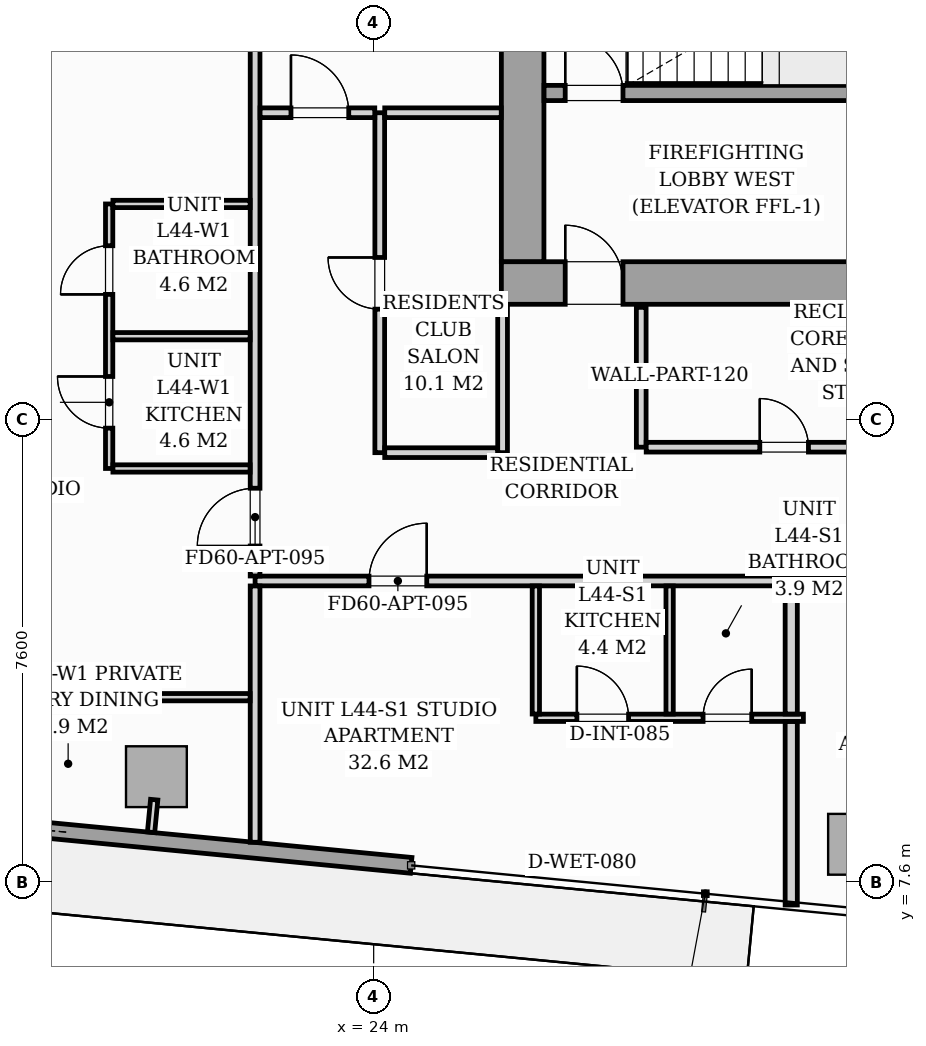
"""IFC4 building model, lengths in metres.
Left out: names, types, materials, properties, quantities, classifications, styles, units other than length and angle.
Written with IfcOpenShell. Run it as: python <this file> out.ifc"""

import sys

from ifc_helpers import new_model, si_unit, direction, frame, frame_2d, origin, origin_2d, place, context, subcontext, project, spatial, rectangle, i_section, extrude, source, transform, mapped, element, fill, save


model = new_model("IFC4")
c1 = context("Model", 3, precision=1e-05, world=origin(), true_north=direction((0.0, 1.0)))
c2 = subcontext(c1, "Body", "Model", "MODEL_VIEW")
j1 = project(units=[si_unit("LENGTHUNIT", "METRE"), si_unit("PLANEANGLEUNIT", "RADIAN")], contexts=[c1])
p1 = place(None, origin())
s1 = spatial("IfcSite", under=j1, at=p1, CompositionType="ELEMENT")
p2 = place(p1, origin())
s2 = spatial("IfcBuilding", under=s1, at=p2, CompositionType="ELEMENT")
p3 = place(p2, frame((0.0, 0.0, 153.4)))
s3 = spatial("IfcBuildingStorey", under=s2, at=p3, CompositionType="ELEMENT", Elevation=153.4)
m1 = source(origin(), c2, "Body", "SweptSolid", [
    extrude(i_section(OverallWidth=0.421, OverallDepth=0.465, WebThickness=0.045, FlangeThickness=0.073, FilletRadius=0.018, at=origin_2d()), origin(), (0.0, 0.0, 1.0), 3.196),
])
p4 = place(p3, frame((26.4, 17.4, 0.002), z_axis=(0.0, 0.0, 1.0), x_axis=(1.0, 0.0, 0.0)))
e1 = element("IfcColumn", 1, at=p4, inside=s3, PredefinedType="PILASTER", context=c2, shape_type="MappedRepresentation", body=[
    mapped(m1, transform((0.0, 0.0, 0.0), scale=1.0)),
])
m2 = source(origin(), c2, "Body", "SweptSolid", [
    extrude(rectangle(XDim=1.0, YDim=1.0, at=origin_2d()), origin(), (0.0, 0.0, 1.0), 3.196),
])
for number, where, z_axis, x_axis in (
    (2, (20.427, 9.332, 0.002), (0.0, 0.0, 1.0), (0.995, -0.096, 0.0)),
    (3, (31.974, 8.22, 0.002), (0.0, 0.0, 1.0), (0.995, -0.096, 0.0)),
):
    element("IfcColumn", number, at=place(p3, frame(where, z_axis=z_axis, x_axis=x_axis)), inside=s3, PredefinedType="COLUMN", context=c2, shape_type="MappedRepresentation", body=[
        mapped(m2, transform((0.0, 0.0, 0.0), scale=1.0)),
    ])
p5 = place(p3, frame((24.617, 7.873, 0.0), z_axis=(0.0, 0.0, 1.0), x_axis=(-0.995395976631, 0.095848055311, 0.0)))
e4 = element("IfcWall", 4, at=p5, inside=s3, PredefinedType="STANDARD", context=c2, shape_type="SweptSolid", body=[
    extrude(rectangle(XDim=17.01, YDim=0.26, at=frame_2d((8.505, 0.0))), origin(), (0.0, 0.0, 1.0), 2.94),
])
p6 = place(p5, frame((6.51, 0.0, 0.0)))
e5 = element("IfcOpeningElement", 5, at=p6, cuts=e4, PredefinedType="OPENING", context=c2, shape_type="SweptSolid", body=[
    extrude(rectangle(XDim=1.8, YDim=2.06, at=frame_2d((0.9, 1.03))), frame((0.0, 0.14, 0.0), z_axis=(0.0, -1.0, 0.0), x_axis=(1.0, 0.0, 0.0)), (0.0, 0.0, 1.0), 0.28),
])
p7 = place(p5, frame((8.8, 0.0, 0.65)))
e6 = element("IfcOpeningElement", 6, at=p7, cuts=e4, PredefinedType="OPENING", context=c2, shape_type="SweptSolid", body=[
    extrude(rectangle(XDim=1.6, YDim=1.5, at=frame_2d((0.8, 0.75))), frame((0.0, 0.14, 0.0), z_axis=(0.0, -1.0, 0.0), x_axis=(1.0, 0.0, 0.0)), (0.0, 0.0, 1.0), 0.28),
])
p8 = place(p3, frame((26.1, 17.45, 0.0), z_axis=(0.0, 0.0, 1.0), x_axis=(1.0, 0.0, 0.0)))
e7 = element("IfcWall", 7, at=p8, inside=s3, PredefinedType="SHEAR", context=c2, shape_type="SweptSolid", body=[
    extrude(rectangle(XDim=19.8, YDim=0.7, at=frame_2d((9.9, 0.0))), origin(), (0.0, 0.0, 1.0), 3.2),
])
p9 = place(p8, frame((1.05, 0.0, 0.0)))
e8 = element("IfcOpeningElement", 8, at=p9, cuts=e7, PredefinedType="OPENING", context=c2, shape_type="SweptSolid", body=[
    extrude(rectangle(XDim=0.95, YDim=2.06, at=frame_2d((0.475, 1.03))), frame((0.0, 0.36, 0.0), z_axis=(0.0, -1.0, 0.0), x_axis=(1.0, 0.0, 0.0)), (0.0, 0.0, 1.0), 0.72),
])
p10 = place(p8, frame((9.48, 0.0, 0.0)))
e9 = element("IfcOpeningElement", 9, at=p10, cuts=e7, PredefinedType="OPENING", context=c2, shape_type="SweptSolid", body=[
    extrude(rectangle(XDim=0.85, YDim=2.0, at=frame_2d((0.425, 1.0))), frame((0.0, 0.36, 0.0), z_axis=(0.0, -1.0, 0.0), x_axis=(1.0, 0.0, 0.0)), (0.0, 0.0, 1.0), 0.72),
])
p11 = place(p8, frame((17.65, 0.0, 0.0)))
e10 = element("IfcOpeningElement", 10, at=p11, cuts=e7, PredefinedType="OPENING", context=c2, shape_type="SweptSolid", body=[
    extrude(rectangle(XDim=0.95, YDim=2.06, at=frame_2d((0.475, 1.03))), frame((0.0, 0.36, 0.0), z_axis=(0.0, -1.0, 0.0), x_axis=(1.0, 0.0, 0.0)), (0.0, 0.0, 1.0), 0.72),
])
p12 = place(p3, frame((26.45, 17.802, 0.0), z_axis=(0.0, 0.0, 1.0), x_axis=(0.0, 1.0, 0.0)))
e11 = element("IfcWall", 11, at=p12, inside=s3, PredefinedType="SHEAR", context=c2, shape_type="SweptSolid", body=[
    extrude(rectangle(XDim=5.796, YDim=0.7, at=frame_2d((2.898, 0.0))), origin(), (0.0, 0.0, 1.0), 3.2),
])
p13 = place(p3, frame((26.802, 20.575, 0.0), z_axis=(0.0, 0.0, 1.0), x_axis=(1.0, 0.0, 0.0)))
e12 = element("IfcWall", 12, at=p13, inside=s3, PredefinedType="SOLIDWALL", context=c2, shape_type="SweptSolid", body=[
    extrude(rectangle(XDim=8.148, YDim=0.25, at=frame_2d((4.074, 0.0))), origin(), (0.0, 0.0, 1.0), 3.2),
])
p14 = place(p13, frame((0.348, 0.0, 0.0)))
e13 = element("IfcOpeningElement", 13, at=p14, cuts=e12, PredefinedType="OPENING", context=c2, shape_type="SweptSolid", body=[
    extrude(rectangle(XDim=0.95, YDim=2.06, at=frame_2d((0.475, 1.03))), frame((0.0, 0.135, 0.0), z_axis=(0.0, -1.0, 0.0), x_axis=(1.0, 0.0, 0.0)), (0.0, 0.0, 1.0), 0.27),
])
p15 = place(p3, frame((28.4, 14.75, 0.0), z_axis=(0.0, 0.0, 1.0), x_axis=(0.0, 1.0, 0.0)))
e14 = element("IfcWall", 14, at=p15, inside=s3, PredefinedType="PARTITIONING", context=c2, shape_type="SweptSolid", body=[
    extrude(rectangle(XDim=2.3, YDim=0.16, at=frame_2d((1.15, 0.0))), origin(), (0.0, 0.0, 1.0), 2.94),
])
p16 = place(p3, frame((28.482, 14.75, 0.0), z_axis=(0.0, 0.0, 1.0), x_axis=(1.0, 0.0, 0.0)))
e15 = element("IfcWall", 15, at=p16, inside=s3, PredefinedType="PARTITIONING", context=c2, shape_type="SweptSolid", body=[
    extrude(rectangle(XDim=4.516, YDim=0.16, at=frame_2d((2.258, 0.0))), origin(), (0.0, 0.0, 1.0), 2.94),
])
p17 = place(p16, frame((1.868, 0.0, 0.0)))
e16 = element("IfcOpeningElement", 16, at=p17, cuts=e15, PredefinedType="OPENING", context=c2, shape_type="SweptSolid", body=[
    extrude(rectangle(XDim=0.8, YDim=2.05, at=frame_2d((0.4, 1.025))), frame((0.0, 0.09, 0.0), z_axis=(0.0, -1.0, 0.0), x_axis=(1.0, 0.0, 0.0)), (0.0, 0.0, 1.0), 0.18),
])
p18 = place(p3, frame((22.05, 12.55, 0.0), z_axis=(0.0, 0.0, 1.0), x_axis=(1.0, 0.0, 0.0)))
e17 = element("IfcWall", 17, at=p18, inside=s3, PredefinedType="PARTITIONING", context=c2, shape_type="SweptSolid", body=[
    extrude(rectangle(XDim=23.83, YDim=0.16, at=frame_2d((11.915, 0.0))), origin(), (0.0, 0.0, 1.0), 2.94),
])
p19 = place(p18, frame((1.873, 0.0, 0.0)))
e18 = element("IfcOpeningElement", 18, at=p19, cuts=e17, PredefinedType="OPENING", context=c2, shape_type="SweptSolid", body=[
    extrude(rectangle(XDim=0.95, YDim=2.06, at=frame_2d((0.475, 1.03))), frame((0.0, 0.09, 0.0), z_axis=(0.0, -1.0, 0.0), x_axis=(1.0, 0.0, 0.0)), (0.0, 0.0, 1.0), 0.18),
])
p20 = place(p18, frame((10.224, 0.0, 0.0)))
e19 = element("IfcOpeningElement", 19, at=p20, cuts=e17, PredefinedType="OPENING", context=c2, shape_type="SweptSolid", body=[
    extrude(rectangle(XDim=0.95, YDim=2.06, at=frame_2d((0.475, 1.03))), frame((0.0, 0.09, 0.0), z_axis=(0.0, -1.0, 0.0), x_axis=(1.0, 0.0, 0.0)), (0.0, 0.0, 1.0), 0.18),
])
p21 = place(p18, frame((21.84, 0.0, 0.0)))
e20 = element("IfcOpeningElement", 20, at=p21, cuts=e17, PredefinedType="OPENING", context=c2, shape_type="SweptSolid", body=[
    extrude(rectangle(XDim=0.95, YDim=2.06, at=frame_2d((0.475, 1.03))), frame((0.0, 0.09, 0.0), z_axis=(0.0, -1.0, 0.0), x_axis=(1.0, 0.0, 0.0)), (0.0, 0.0, 1.0), 0.18),
])
p22 = place(p3, frame((22.05, 8.253, 0.0), z_axis=(0.0, 0.0, 1.0), x_axis=(0.0, 1.0, 0.0)))
e21 = element("IfcWall", 21, at=p22, inside=s3, PredefinedType="PARTITIONING", context=c2, shape_type="SweptSolid", body=[
    extrude(rectangle(XDim=4.215, YDim=0.16, at=frame_2d((2.107, 0.0))), origin(), (0.0, 0.0, 1.0), 2.94),
])
p23 = place(p3, frame((22.05, 12.632, 0.0), z_axis=(0.0, 0.0, 1.0), x_axis=(0.0, 1.0, 0.0)))
e22 = element("IfcWall", 22, at=p23, inside=s3, PredefinedType="PARTITIONING", context=c2, shape_type="SweptSolid", body=[
    extrude(rectangle(XDim=14.785, YDim=0.16, at=frame_2d((7.393, 0.0))), origin(), (0.0, 0.0, 1.0), 2.94),
])
p24 = place(p23, frame((0.493, 0.0, 0.0)))
e23 = element("IfcOpeningElement", 23, at=p24, cuts=e22, PredefinedType="OPENING", context=c2, shape_type="SweptSolid", body=[
    extrude(rectangle(XDim=0.95, YDim=2.06, at=frame_2d((0.475, 1.03))), frame((0.0, 0.09, 0.0), z_axis=(0.0, -1.0, 0.0), x_axis=(1.0, 0.0, 0.0)), (0.0, 0.0, 1.0), 0.18),
])
p25 = place(p3, frame((26.667, 10.3, 0.0), z_axis=(0.0, 0.0, 1.0), x_axis=(1.0, 0.0, 0.0)))
e24 = element("IfcWall", 24, at=p25, inside=s3, PredefinedType="PARTITIONING", context=c2, shape_type="SweptSolid", body=[
    extrude(rectangle(XDim=4.4, YDim=0.12, at=frame_2d((2.2, 0.0))), origin(), (0.0, 0.0, 1.0), 2.94),
])
p26 = place(p25, frame((0.675, 0.0, 0.0)))
e25 = element("IfcOpeningElement", 25, at=p26, cuts=e24, PredefinedType="OPENING", context=c2, shape_type="SweptSolid", body=[
    extrude(rectangle(XDim=0.85, YDim=2.05, at=frame_2d((0.425, 1.025))), frame((0.0, 0.07, 0.0), z_axis=(0.0, -1.0, 0.0), x_axis=(1.0, 0.0, 0.0)), (0.0, 0.0, 1.0), 0.14),
])
p27 = place(p25, frame((2.75, 0.0, 0.0)))
e26 = element("IfcOpeningElement", 26, at=p27, cuts=e24, PredefinedType="OPENING", context=c2, shape_type="SweptSolid", body=[
    extrude(rectangle(XDim=0.8, YDim=2.02, at=frame_2d((0.4, 1.01))), frame((0.0, 0.07, 0.0), z_axis=(0.0, -1.0, 0.0), x_axis=(1.0, 0.0, 0.0)), (0.0, 0.0, 1.0), 0.14),
])
for number, where, z_axis, x_axis in (
    (27, (26.667, 10.362, 0.0), (0.0, 0.0, 1.0), (0.0, 1.0, 0.0)),
    (28, (28.867, 10.362, 0.0), (0.0, 0.0, 1.0), (0.0, 1.0, 0.0)),
):
    element("IfcWall", number, at=place(p3, frame(where, z_axis=z_axis, x_axis=x_axis)), inside=s3, PredefinedType="PARTITIONING", context=c2, shape_type="SweptSolid", body=[
        extrude(rectangle(XDim=2.106, YDim=0.12, at=frame_2d((1.053, 0.0))), origin(), (0.0, 0.0, 1.0), 2.94),
    ])
p28 = place(p3, frame((30.867, 7.221, 0.0), z_axis=(0.0, 0.0, 1.0), x_axis=(0.0, 1.0, 0.0)))
e29 = element("IfcWall", 29, at=p28, inside=s3, PredefinedType="PARTITIONING", context=c2, shape_type="SweptSolid", body=[
    extrude(rectangle(XDim=3.017, YDim=0.2, at=frame_2d((1.508, 0.0))), origin(), (0.0, 0.0, 1.0), 2.94),
])
p29 = place(p3, frame((30.867, 10.362, 0.0), z_axis=(0.0, 0.0, 1.0), x_axis=(0.0, 1.0, 0.0)))
e30 = element("IfcWall", 30, at=p29, inside=s3, PredefinedType="PARTITIONING", context=c2, shape_type="SweptSolid", body=[
    extrude(rectangle(XDim=2.106, YDim=0.2, at=frame_2d((1.053, 0.0))), origin(), (0.0, 0.0, 1.0), 2.94),
])
p30 = place(p3, frame((19.65, 14.4, 0.0), z_axis=(0.0, 0.0, 1.0), x_axis=(0.0, 1.0, 0.0)))
e31 = element("IfcWall", 31, at=p30, inside=s3, PredefinedType="PARTITIONING", context=c2, shape_type="SweptSolid", body=[
    extrude(rectangle(XDim=4.35, YDim=0.12, at=frame_2d((2.175, 0.0))), origin(), (0.0, 0.0, 1.0), 2.94),
])
p31 = place(p30, frame((0.663, 0.0, 0.0)))
e32 = element("IfcOpeningElement", 32, at=p31, cuts=e31, PredefinedType="OPENING", context=c2, shape_type="SweptSolid", body=[
    extrude(rectangle(XDim=0.85, YDim=2.05, at=frame_2d((0.425, 1.025))), frame((0.0, 0.07, 0.0), z_axis=(0.0, -1.0, 0.0), x_axis=(1.0, 0.0, 0.0)), (0.0, 0.0, 1.0), 0.14),
])
p32 = place(p30, frame((2.863, 0.0, 0.0)))
e33 = element("IfcOpeningElement", 33, at=p32, cuts=e31, PredefinedType="OPENING", context=c2, shape_type="SweptSolid", body=[
    extrude(rectangle(XDim=0.8, YDim=2.02, at=frame_2d((0.4, 1.01))), frame((0.0, 0.07, 0.0), z_axis=(0.0, -1.0, 0.0), x_axis=(1.0, 0.0, 0.0)), (0.0, 0.0, 1.0), 0.14),
])
for number, where, z_axis, x_axis in (
    (34, (19.712, 16.575, 0.0), (0.0, 0.0, 1.0), (1.0, 0.0, 0.0)),
    (35, (19.712, 14.4, 0.0), (0.0, 0.0, 1.0), (1.0, 0.0, 0.0)),
    (36, (19.712, 18.75, 0.0), (0.0, 0.0, 1.0), (1.0, 0.0, 0.0)),
):
    element("IfcWall", number, at=place(p3, frame(where, z_axis=z_axis, x_axis=x_axis)), inside=s3, PredefinedType="PARTITIONING", context=c2, shape_type="SweptSolid", body=[
        extrude(rectangle(XDim=2.256, YDim=0.12, at=frame_2d((1.128, 0.0))), origin(), (0.0, 0.0, 1.0), 2.94),
    ])
p33 = place(p3, frame((8.395, 10.639, 0.0), z_axis=(0.0, 0.0, 1.0), x_axis=(1.0, 0.0, 0.0)))
e37 = element("IfcWall", 37, at=p33, inside=s3, PredefinedType="PARTITIONING", context=c2, shape_type="SweptSolid", body=[
    extrude(rectangle(XDim=13.573, YDim=0.12, at=frame_2d((6.787, 0.0))), origin(), (0.0, 0.0, 1.0), 2.94),
])
p34 = place(p33, frame((7.451, 0.0, 0.0)))
e38 = element("IfcOpeningElement", 38, at=p34, cuts=e37, PredefinedType="OPENING", context=c2, shape_type="SweptSolid", body=[
    extrude(rectangle(XDim=0.85, YDim=2.05, at=frame_2d((0.425, 1.025))), frame((0.0, 0.07, 0.0), z_axis=(0.0, -1.0, 0.0), x_axis=(1.0, 0.0, 0.0)), (0.0, 0.0, 1.0), 0.14),
])
p35 = place(p3, frame((24.1, 14.66, 0.0), z_axis=(0.0, 0.0, 1.0), x_axis=(0.0, 1.0, 0.0)))
e39 = element("IfcWall", 39, at=p35, inside=s3, PredefinedType="PARTITIONING", context=c2, shape_type="SweptSolid", body=[
    extrude(rectangle(XDim=5.59, YDim=0.16, at=frame_2d((2.795, 0.0))), origin(), (0.0, 0.0, 1.0), 2.94),
])
p36 = place(p35, frame((2.36, 0.0, 0.0)))
e40 = element("IfcOpeningElement", 40, at=p36, cuts=e39, PredefinedType="OPENING", context=c2, shape_type="SweptSolid", body=[
    extrude(rectangle(XDim=0.85, YDim=2.0, at=frame_2d((0.425, 1.0))), frame((0.0, 0.09, 0.0), z_axis=(0.0, -1.0, 0.0), x_axis=(1.0, 0.0, 0.0)), (0.0, 0.0, 1.0), 0.18),
])
p37 = place(p3, frame((22.132, 20.25, 0.0), z_axis=(0.0, 0.0, 1.0), x_axis=(1.0, 0.0, 0.0)))
e41 = element("IfcWall", 41, at=p37, inside=s3, PredefinedType="PARTITIONING", context=c2, shape_type="SweptSolid", body=[
    extrude(rectangle(XDim=1.886, YDim=0.16, at=frame_2d((0.943, 0.0))), origin(), (0.0, 0.0, 1.0), 2.94),
])
p38 = place(p37, frame((0.508, 0.0, 0.0)))
e42 = element("IfcOpeningElement", 42, at=p38, cuts=e41, PredefinedType="OPENING", context=c2, shape_type="SweptSolid", body=[
    extrude(rectangle(XDim=0.95, YDim=2.06, at=frame_2d((0.475, 1.03))), frame((0.0, 0.09, 0.0), z_axis=(0.0, -1.0, 0.0), x_axis=(1.0, 0.0, 0.0)), (0.0, 0.0, 1.0), 0.18),
])
p39 = place(p3, frame((24.182, 20.25, 0.0), z_axis=(0.0, 0.0, 1.0), x_axis=(1.0, 0.0, 0.0)))
e43 = element("IfcWall", 43, at=p39, inside=s3, PredefinedType="PARTITIONING", context=c2, shape_type="SweptSolid", body=[
    extrude(rectangle(XDim=1.916, YDim=0.16, at=frame_2d((0.958, 0.0))), origin(), (0.0, 0.0, 1.0), 2.94),
])
p40 = place(p3, frame((26.12, 14.66, 0.0), z_axis=(0.0, 0.0, 1.0), x_axis=(0.0, 1.0, 0.0)))
e44 = element("IfcWall", 44, at=p40, inside=s3, PredefinedType="PARTITIONING", context=c2, shape_type="SweptSolid", body=[
    extrude(rectangle(XDim=2.438, YDim=0.16, at=frame_2d((1.219, 0.0))), origin(), (0.0, 0.0, 1.0), 2.94),
])
p41 = place(p3, frame((24.182, 14.66, 0.0), z_axis=(0.0, 0.0, 1.0), x_axis=(1.0, 0.0, 0.0)))
e45 = element("IfcWall", 45, at=p41, inside=s3, PredefinedType="PARTITIONING", context=c2, shape_type="SweptSolid", body=[
    extrude(rectangle(XDim=1.856, YDim=0.16, at=frame_2d((0.928, 0.0))), origin(), (0.0, 0.0, 1.0), 2.94),
])
p42 = place(p3, frame((20.391, 8.953, 0.0), z_axis=(0.0, 0.0, 1.0), x_axis=(-0.096222656154, -0.995359834654, 0.0)))
e46 = element("IfcWall", 46, at=p42, inside=s3, PredefinedType="PARTITIONING", context=c2, shape_type="SweptSolid", body=[
    extrude(rectangle(XDim=0.538, YDim=0.12, at=frame_2d((0.269, 0.0))), origin(), (0.0, 0.0, 1.0), 2.94),
])
m3 = source(origin(), c2, "Body", "SweptSolid", [
    extrude(rectangle(XDim=0.95, YDim=2.06, at=frame_2d((0.475, 1.03))), frame((0.0, 0.025, 0.0), z_axis=(0.0, -1.0, 0.0), x_axis=(1.0, 0.0, 0.0)), (0.0, 0.0, 1.0), 0.05),
])
p43 = place(p9, origin())
e47 = element("IfcDoor", 47, at=p43, inside=s3, OperationType="SINGLE_SWING_LEFT", PredefinedType="DOOR", context=c2, shape_type="MappedRepresentation", body=[
    mapped(m3, transform((0.0, 0.0, 0.0), scale=1.0)),
])
fill(e8, e47)
p44 = place(p14, origin())
e48 = element("IfcDoor", 48, at=p44, inside=s3, OperationType="SINGLE_SWING_LEFT", PredefinedType="DOOR", context=c2, shape_type="MappedRepresentation", body=[
    mapped(m3, transform((0.0, 0.0, 0.0), scale=1.0)),
])
fill(e13, e48)
m4 = source(origin(), c2, "Body", "SweptSolid", [
    extrude(rectangle(XDim=0.8, YDim=2.05, at=frame_2d((0.4, 1.025))), frame((0.0, 0.025, 0.0), z_axis=(0.0, -1.0, 0.0), x_axis=(1.0, 0.0, 0.0)), (0.0, 0.0, 1.0), 0.05),
])
p45 = place(p17, origin())
e49 = element("IfcDoor", 49, at=p45, inside=s3, OperationType="SINGLE_SWING_LEFT", PredefinedType="DOOR", context=c2, shape_type="MappedRepresentation", body=[
    mapped(m4, transform((0.0, 0.0, 0.0), scale=1.0)),
])
fill(e16, e49)
m5 = source(origin(), c2, "Body", "SweptSolid", [
    extrude(rectangle(XDim=0.95, YDim=2.06, at=frame_2d((0.475, 1.03))), frame((0.0, 0.025, 0.0), z_axis=(0.0, -1.0, 0.0), x_axis=(1.0, 0.0, 0.0)), (0.0, 0.0, 1.0), 0.05),
])
p46 = place(p19, origin())
e50 = element("IfcDoor", 50, at=p46, inside=s3, OperationType="SINGLE_SWING_RIGHT", PredefinedType="DOOR", context=c2, shape_type="MappedRepresentation", body=[
    mapped(m5, transform((0.0, 0.0, 0.0), scale=1.0)),
])
fill(e18, e50)
m6 = source(origin(), c2, "Body", "SweptSolid", [
    extrude(rectangle(XDim=0.85, YDim=2.05, at=frame_2d((0.425, 1.025))), frame((0.0, 0.025, 0.0), z_axis=(0.0, -1.0, 0.0), x_axis=(1.0, 0.0, 0.0)), (0.0, 0.0, 1.0), 0.05),
])
p47 = place(p26, origin())
e51 = element("IfcDoor", 51, at=p47, inside=s3, OperationType="SINGLE_SWING_LEFT", PredefinedType="DOOR", context=c2, shape_type="MappedRepresentation", body=[
    mapped(m6, transform((0.0, 0.0, 0.0), scale=1.0)),
])
fill(e25, e51)
m7 = source(origin(), c2, "Body", "SweptSolid", [
    extrude(rectangle(XDim=0.8, YDim=2.02, at=frame_2d((0.4, 1.01))), frame((0.0, 0.025, 0.0), z_axis=(0.0, -1.0, 0.0), x_axis=(1.0, 0.0, 0.0)), (0.0, 0.0, 1.0), 0.05),
])
p48 = place(p27, origin())
e52 = element("IfcDoor", 52, at=p48, inside=s3, OperationType="SINGLE_SWING_RIGHT", PredefinedType="DOOR", context=c2, shape_type="MappedRepresentation", body=[
    mapped(m7, transform((0.0, 0.0, 0.0), scale=1.0)),
])
fill(e26, e52)
p49 = place(p24, origin())
e53 = element("IfcDoor", 53, at=p49, inside=s3, OperationType="SINGLE_SWING_LEFT", PredefinedType="DOOR", context=c2, shape_type="MappedRepresentation", body=[
    mapped(m5, transform((0.0, 0.0, 0.0), scale=1.0)),
])
fill(e23, e53)
p50 = place(p31, origin())
e54 = element("IfcDoor", 54, at=p50, inside=s3, OperationType="SINGLE_SWING_RIGHT", PredefinedType="DOOR", context=c2, shape_type="MappedRepresentation", body=[
    mapped(m6, transform((0.0, 0.0, 0.0), scale=1.0)),
])
fill(e32, e54)
p51 = place(p32, origin())
e55 = element("IfcDoor", 55, at=p51, inside=s3, OperationType="SINGLE_SWING_LEFT", PredefinedType="DOOR", context=c2, shape_type="MappedRepresentation", body=[
    mapped(m7, transform((0.0, 0.0, 0.0), scale=1.0)),
])
fill(e33, e55)
m8 = source(origin(), c2, "Body", "SweptSolid", [
    extrude(rectangle(XDim=0.85, YDim=2.0, at=frame_2d((0.425, 1.0))), frame((0.0, 0.025, 0.0), z_axis=(0.0, -1.0, 0.0), x_axis=(1.0, 0.0, 0.0)), (0.0, 0.0, 1.0), 0.05),
])
p52 = place(p36, origin())
e56 = element("IfcDoor", 56, at=p52, inside=s3, OperationType="SINGLE_SWING_RIGHT", PredefinedType="DOOR", context=c2, shape_type="MappedRepresentation", body=[
    mapped(m8, transform((0.0, 0.0, 0.0), scale=1.0)),
])
fill(e40, e56)
p53 = place(p38, origin())
e57 = element("IfcDoor", 57, at=p53, inside=s3, OperationType="SINGLE_SWING_LEFT", PredefinedType="DOOR", context=c2, shape_type="MappedRepresentation", body=[
    mapped(m5, transform((0.0, 0.0, 0.0), scale=1.0)),
])
fill(e42, e57)
save(model, sys.argv[1])
